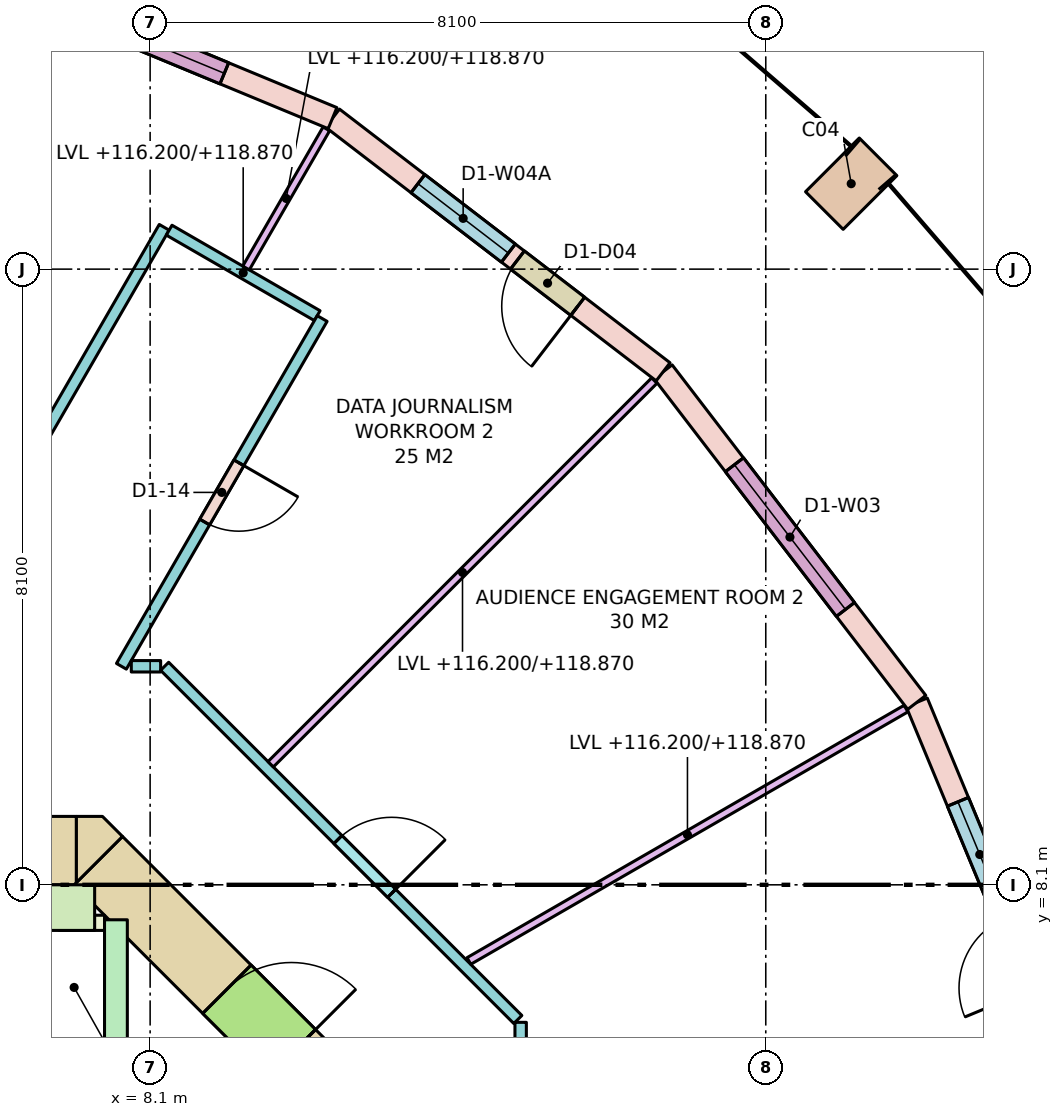
"""IFC4 building model, lengths in metres.
Left out: names, types, materials, properties, quantities, classifications, styles, units other than length and angle.
Written with IfcOpenShell. Run it as: python <this file> out.ifc"""

import sys

from ifc_helpers import new_model, si_unit, direction, frame, frame_2d, origin, origin_2d, place, context, subcontext, project, spatial, polyline, rectangle, outline, extrude, element, fill, save


model = new_model("IFC4")
c1 = context("Model", 3, precision=1e-05, world=origin(), true_north=direction((0.0, 1.0)))
c2 = subcontext(c1, "Body", "Model", "MODEL_VIEW")
j1 = project(units=[si_unit("LENGTHUNIT", "METRE"), si_unit("PLANEANGLEUNIT", "RADIAN")], contexts=[c1])
p1 = place(None, origin())
s1 = spatial("IfcSite", under=j1, at=p1, CompositionType="ELEMENT")
p2 = place(p1, origin())
s2 = spatial("IfcBuilding", under=s1, at=p2, CompositionType="ELEMENT")
p3 = place(p2, frame((0.0, 0.0, 116.2)))
s3 = spatial("IfcBuildingStorey", under=s2, at=p3, CompositionType="ELEMENT", Elevation=116.2)
p4 = place(p3, frame((17.324, 17.324, 0.0), z_axis=(0.0, 0.0, 1.0), x_axis=(-0.707106781187, 0.707106781187, 0.0)))
e1 = element("IfcColumn", 1, at=p4, inside=s3, PredefinedType="COLUMN", context=c2, shape_type="SweptSolid", body=[
    extrude(rectangle(XDim=0.7, YDim=1.0, at=origin_2d()), origin(), (0.0, 0.0, 1.0), 3.8),
])
p5 = place(p3, frame((-7.13, 8.55, -0.28), z_axis=(0.0, 0.0, 1.0), x_axis=(1.0, 0.0, 0.0)))
e2 = element("IfcWall", 2, at=p5, inside=s3, PredefinedType="SHEAR", context=c2, shape_type="SweptSolid", body=[
    extrude(rectangle(XDim=14.26, YDim=0.9, at=frame_2d((7.13, 0.0))), origin(), (0.0, 0.0, 1.0), 3.8),
])
p6 = place(p5, frame((5.48, 0.0, 0.28)))
e3 = element("IfcOpeningElement", 3, at=p6, cuts=e2, PredefinedType="OPENING", context=c2, shape_type="SweptSolid", body=[
    extrude(rectangle(XDim=0.7, YDim=2.1, at=frame_2d((0.35, 1.05))), frame((0.0, 0.46, 0.0), z_axis=(0.0, -1.0, 0.0), x_axis=(1.0, 0.0, 0.0)), (0.0, 0.0, 1.0), 0.92),
])
p7 = place(p5, frame((7.155, 0.0, 0.28)))
e4 = element("IfcOpeningElement", 4, at=p7, cuts=e2, PredefinedType="OPENING", context=c2, shape_type="SweptSolid", body=[
    extrude(rectangle(XDim=0.9, YDim=2.1, at=frame_2d((0.45, 1.05))), frame((0.0, 0.46, 0.0), z_axis=(0.0, -1.0, 0.0), x_axis=(1.0, 0.0, 0.0)), (0.0, 0.0, 1.0), 0.92),
])
p8 = place(p3, frame((7.418, 8.418, -0.28), z_axis=(0.0, 0.0, 1.0), x_axis=(0.707106781187, -0.707106781187, 0.0)))
e5 = element("IfcWall", 5, at=p8, inside=s3, PredefinedType="SHEAR", context=c2, shape_type="SweptSolid", body=[
    extrude(rectangle(XDim=4.243, YDim=0.9, at=frame_2d((2.121, 0.0))), origin(), (0.0, 0.0, 1.0), 3.8),
])
p9 = place(p8, frame((2.393, 0.0, 0.28)))
e6 = element("IfcOpeningElement", 6, at=p9, cuts=e5, PredefinedType="OPENING", context=c2, shape_type="SweptSolid", body=[
    extrude(rectangle(XDim=1.2, YDim=2.1, at=frame_2d((0.6, 1.05))), frame((0.0, 0.46, 0.0), z_axis=(0.0, -1.0, 0.0), x_axis=(1.0, 0.0, 0.0)), (0.0, 0.0, 1.0), 0.92),
])
p10 = place(p3, frame((0.0, 0.0, -0.28)))
e7 = element("IfcWall", 7, at=p10, inside=s3, PredefinedType="SHEAR", context=c2, shape_type="SweptSolid", body=[
    extrude(outline(polyline([(7.473, 9.0), (7.736, 8.736), (7.13, 8.13), (7.13, 9.0), (7.473, 9.0)])), origin(), (0.0, 0.0, 1.0), 3.8),
])
p11 = place(p3, frame((7.65, 4.5, 0.0), z_axis=(0.0, 0.0, 1.0), x_axis=(0.0, 1.0, 0.0)))
e8 = element("IfcWall", 8, at=p11, inside=s3, PredefinedType="SHEAR", context=c2, shape_type="SweptSolid", body=[
    extrude(rectangle(XDim=3.14, YDim=0.3, at=frame_2d((1.57, 0.0))), origin(), (0.0, 0.0, 1.0), 3.52),
])
p12 = place(p11, frame((0.14, 0.0, 0.0)))
e9 = element("IfcOpeningElement", 9, at=p12, cuts=e8, PredefinedType="OPENING", context=c2, shape_type="SweptSolid", body=[
    extrude(rectangle(XDim=1.32, YDim=2.1, at=frame_2d((0.66, 1.05))), frame((0.0, 0.16, 0.0), z_axis=(0.0, -1.0, 0.0), x_axis=(1.0, 0.0, 0.0)), (0.0, 0.0, 1.0), 0.32),
])
p13 = place(p3, frame((2.0, 7.8, 0.0), z_axis=(0.0, 0.0, 1.0), x_axis=(1.0, 0.0, 0.0)))
e10 = element("IfcWall", 10, at=p13, inside=s3, PredefinedType="SHEAR", context=c2, shape_type="SweptSolid", body=[
    extrude(rectangle(XDim=5.37, YDim=0.6, at=frame_2d((2.685, 0.0))), origin(), (0.0, 0.0, 1.0), 3.52),
])
p14 = place(p3, frame((6.9, 7.6, 0.0), z_axis=(0.0, 0.0, 1.0), x_axis=(1.0, 0.0, 0.0)))
e11 = element("IfcWall", 11, at=p14, inside=s3, PredefinedType="SHEAR", context=c2, shape_type="SweptSolid", body=[
    extrude(rectangle(XDim=0.6, YDim=0.2, at=frame_2d((0.3, 0.0))), origin(), (0.0, 0.0, 1.0), 3.52),
])
p15 = place(p3, frame((20.284, 5.435, 0.0), z_axis=(0.0, 0.0, 1.0), x_axis=(-0.382688740813, 0.923877333662, 0.0)))
e12 = element("IfcWall", 12, at=p15, inside=s3, PredefinedType="STANDARD", context=c2, shape_type="SweptSolid", body=[
    extrude(rectangle(XDim=5.482, YDim=0.3, at=frame_2d((2.741, 0.0))), origin(), (0.0, 0.0, 1.0), 3.52),
])
p16 = place(p15, frame((1.416, 0.0, 0.0)))
e13 = element("IfcOpeningElement", 13, at=p16, cuts=e12, PredefinedType="OPENING", context=c2, shape_type="SweptSolid", body=[
    extrude(rectangle(XDim=1.0, YDim=2.4, at=frame_2d((0.5, 1.2))), frame((0.0, 0.16, 0.0), z_axis=(0.0, -1.0, 0.0), x_axis=(1.0, 0.0, 0.0)), (0.0, 0.0, 1.0), 0.32),
])
p17 = place(p15, frame((2.566, 0.0, 0.8)))
e14 = element("IfcOpeningElement", 14, at=p17, cuts=e12, PredefinedType="OPENING", context=c2, shape_type="SweptSolid", body=[
    extrude(rectangle(XDim=1.5, YDim=2.5, at=frame_2d((0.75, 1.25))), frame((0.0, 0.16, 0.0), z_axis=(0.0, -1.0, 0.0), x_axis=(1.0, 0.0, 0.0)), (0.0, 0.0, 1.0), 0.32),
])
p18 = place(p3, frame((18.187, 10.5, 0.0), z_axis=(0.0, 0.0, 1.0), x_axis=(-0.608784891166, 0.793335336593, 0.0)))
e15 = element("IfcWall", 15, at=p18, inside=s3, PredefinedType="STANDARD", context=c2, shape_type="SweptSolid", body=[
    extrude(rectangle(XDim=5.482, YDim=0.3, at=frame_2d((2.741, 0.0))), origin(), (0.0, 0.0, 1.0), 3.52),
])
p19 = place(p18, frame((1.541, 0.0, 0.8)))
e16 = element("IfcOpeningElement", 16, at=p19, cuts=e15, PredefinedType="OPENING", context=c2, shape_type="SweptSolid", body=[
    extrude(rectangle(XDim=2.4, YDim=2.5, at=frame_2d((1.2, 1.25))), frame((0.0, 0.16, 0.0), z_axis=(0.0, -1.0, 0.0), x_axis=(1.0, 0.0, 0.0)), (0.0, 0.0, 1.0), 0.32),
])
p20 = place(p3, frame((14.849, 14.849, 0.0), z_axis=(0.0, 0.0, 1.0), x_axis=(-0.793335336593, 0.608784891166, 0.0)))
e17 = element("IfcWall", 17, at=p20, inside=s3, PredefinedType="STANDARD", context=c2, shape_type="SweptSolid", body=[
    extrude(rectangle(XDim=5.482, YDim=0.3, at=frame_2d((2.741, 0.0))), origin(), (0.0, 0.0, 1.0), 3.52),
])
p21 = place(p20, frame((1.416, 0.0, 0.0)))
e18 = element("IfcOpeningElement", 18, at=p21, cuts=e17, PredefinedType="OPENING", context=c2, shape_type="SweptSolid", body=[
    extrude(rectangle(XDim=1.0, YDim=2.4, at=frame_2d((0.5, 1.2))), frame((0.0, 0.16, 0.0), z_axis=(0.0, -1.0, 0.0), x_axis=(1.0, 0.0, 0.0)), (0.0, 0.0, 1.0), 0.32),
])
p22 = place(p20, frame((2.566, 0.0, 0.8)))
e19 = element("IfcOpeningElement", 19, at=p22, cuts=e17, PredefinedType="OPENING", context=c2, shape_type="SweptSolid", body=[
    extrude(rectangle(XDim=1.5, YDim=2.5, at=frame_2d((0.75, 1.25))), frame((0.0, 0.16, 0.0), z_axis=(0.0, -1.0, 0.0), x_axis=(1.0, 0.0, 0.0)), (0.0, 0.0, 1.0), 0.32),
])
p23 = place(p3, frame((10.5, 18.187, 0.0), z_axis=(0.0, 0.0, 1.0), x_axis=(-0.923877333662, 0.382688740813, 0.0)))
e20 = element("IfcWall", 20, at=p23, inside=s3, PredefinedType="STANDARD", context=c2, shape_type="SweptSolid", body=[
    extrude(rectangle(XDim=5.482, YDim=0.3, at=frame_2d((2.741, 0.0))), origin(), (0.0, 0.0, 1.0), 3.52),
])
p24 = place(p23, frame((1.541, 0.0, 0.8)))
e21 = element("IfcOpeningElement", 21, at=p24, cuts=e20, PredefinedType="OPENING", context=c2, shape_type="SweptSolid", body=[
    extrude(rectangle(XDim=2.4, YDim=2.5, at=frame_2d((1.2, 1.25))), frame((0.0, 0.16, 0.0), z_axis=(0.0, -1.0, 0.0), x_axis=(1.0, 0.0, 0.0)), (0.0, 0.0, 1.0), 0.32),
])
p25 = place(p3, frame((4.983, 11.031, 0.0), z_axis=(0.0, 0.0, 1.0), x_axis=(0.499988075443, 0.866032288321, 0.0)))
e22 = element("IfcWall", 22, at=p25, inside=s3, PredefinedType="PARTITIONING", context=c2, shape_type="SweptSolid", body=[
    extrude(rectangle(XDim=6.604, YDim=0.15, at=frame_2d((3.302, 0.0))), origin(), (0.0, 0.0, 1.0), 3.52),
])
p26 = place(p3, frame((8.35, 16.713, 0.0), z_axis=(0.0, 0.0, 1.0), x_axis=(0.866017533419, -0.500013631625, 0.0)))
e23 = element("IfcWall", 23, at=p26, inside=s3, PredefinedType="PARTITIONING", context=c2, shape_type="SweptSolid", body=[
    extrude(rectangle(XDim=2.25, YDim=0.15, at=frame_2d((1.125, 0.0))), origin(), (0.0, 0.0, 1.0), 2.67),
])
p27 = place(p3, frame((10.364, 15.55, 0.0), z_axis=(0.0, 0.0, 1.0), x_axis=(-0.499981143329, -0.866036290415, 0.0)))
e24 = element("IfcWall", 24, at=p27, inside=s3, PredefinedType="PARTITIONING", context=c2, shape_type="SweptSolid", body=[
    extrude(rectangle(XDim=5.283, YDim=0.15, at=frame_2d((2.642, 0.0))), origin(), (0.0, 0.0, 1.0), 3.52),
])
p28 = place(p27, frame((2.191, 0.0, 0.0)))
e25 = element("IfcOpeningElement", 25, at=p28, cuts=e24, PredefinedType="OPENING", context=c2, shape_type="SweptSolid", body=[
    extrude(rectangle(XDim=0.9, YDim=2.1, at=frame_2d((0.45, 1.05))), frame((0.0, 0.085, 0.0), z_axis=(0.0, -1.0, 0.0), x_axis=(1.0, 0.0, 0.0)), (0.0, 0.0, 1.0), 0.17),
])
p29 = place(p3, frame((7.852, 10.975, 0.0), z_axis=(0.0, 0.0, 1.0), x_axis=(1.0, 0.0, 0.0)))
e26 = element("IfcWall", 26, at=p29, inside=s3, PredefinedType="PARTITIONING", context=c2, shape_type="SweptSolid", body=[
    extrude(rectangle(XDim=0.386, YDim=0.15, at=frame_2d((0.193, 0.0))), origin(), (0.0, 0.0, 1.0), 3.52),
])
p30 = place(p3, frame((8.291, 10.975, 0.0), z_axis=(0.0, 0.0, 1.0), x_axis=(0.707088206597, -0.707125355289, 0.0)))
e27 = element("IfcWall", 27, at=p30, inside=s3, PredefinedType="PARTITIONING", context=c2, shape_type="SweptSolid", body=[
    extrude(rectangle(XDim=6.572, YDim=0.15, at=frame_2d((3.286, 0.0))), origin(), (0.0, 0.0, 1.0), 2.67),
])
p31 = place(p30, frame((3.224, 0.0, 0.0)))
e28 = element("IfcOpeningElement", 28, at=p31, cuts=e27, PredefinedType="OPENING", context=c2, shape_type="SweptSolid", body=[
    extrude(rectangle(XDim=1.0, YDim=2.1, at=frame_2d((0.5, 1.05))), frame((0.0, 0.085, 0.0), z_axis=(0.0, -1.0, 0.0), x_axis=(1.0, 0.0, 0.0)), (0.0, 0.0, 1.0), 0.17),
])
p32 = place(p3, frame((12.975, 6.291, 0.0), z_axis=(0.0, 0.0, 1.0), x_axis=(0.0, -1.0, 0.0)))
e29 = element("IfcWall", 29, at=p32, inside=s3, PredefinedType="PARTITIONING", context=c2, shape_type="SweptSolid", body=[
    extrude(rectangle(XDim=12.582, YDim=0.15, at=frame_2d((6.291, 0.0))), origin(), (0.0, 0.0, 1.0), 2.67),
])
p33 = place(p32, frame((5.391, 0.0, 0.0)))
e30 = element("IfcOpeningElement", 30, at=p33, cuts=e29, PredefinedType="OPENING", context=c2, shape_type="SweptSolid", body=[
    extrude(rectangle(XDim=1.8, YDim=2.1, at=frame_2d((0.9, 1.05))), frame((0.0, 0.085, 0.0), z_axis=(0.0, -1.0, 0.0), x_axis=(1.0, 0.0, 0.0)), (0.0, 0.0, 1.0), 0.17),
])
p34 = place(p3, frame((12.294, 7.098, 0.0), z_axis=(0.0, 0.0, 1.0), x_axis=(0.866010486135, 0.500025837236, 0.0)))
e31 = element("IfcWall", 31, at=p34, inside=s3, PredefinedType="PARTITIONING", context=c2, shape_type="SweptSolid", body=[
    extrude(rectangle(XDim=6.641, YDim=0.1, at=frame_2d((3.32, 0.0))), origin(), (0.0, 0.0, 1.0), 2.67),
])
p35 = place(p3, frame((9.686, 9.686, 0.0), z_axis=(0.0, 0.0, 1.0), x_axis=(0.707106781187, 0.707106781187, 0.0)))
e32 = element("IfcWall", 32, at=p35, inside=s3, PredefinedType="PARTITIONING", context=c2, shape_type="SweptSolid", body=[
    extrude(rectangle(XDim=7.139, YDim=0.1, at=frame_2d((3.569, 0.0))), origin(), (0.0, 0.0, 1.0), 2.67),
])
p36 = place(p3, frame((9.362, 16.215, 0.0), z_axis=(0.0, 0.0, 1.0), x_axis=(0.500015802937, 0.866016279763, 0.0)))
e33 = element("IfcWall", 33, at=p36, inside=s3, PredefinedType="PARTITIONING", context=c2, shape_type="SweptSolid", body=[
    extrude(rectangle(XDim=2.113, YDim=0.1, at=frame_2d((1.057, 0.0))), origin(), (0.0, 0.0, 1.0), 2.67),
])
p37 = place(p17, origin())
e34 = element("IfcWindow", 34, at=p37, inside=s3, PartitioningType="SINGLE_PANEL", PredefinedType="WINDOW", context=c2, shape_type="SweptSolid", body=[
    extrude(rectangle(XDim=1.5, YDim=2.5, at=frame_2d((0.75, 1.25))), frame((0.0, 0.03, 0.0), z_axis=(0.0, -1.0, 0.0), x_axis=(1.0, 0.0, 0.0)), (0.0, 0.0, 1.0), 0.06),
])
fill(e14, e34)
p38 = place(p19, origin())
e35 = element("IfcWindow", 35, at=p38, inside=s3, PartitioningType="SINGLE_PANEL", PredefinedType="WINDOW", context=c2, shape_type="SweptSolid", body=[
    extrude(rectangle(XDim=2.4, YDim=2.5, at=frame_2d((1.2, 1.25))), frame((0.0, 0.03, 0.0), z_axis=(0.0, -1.0, 0.0), x_axis=(1.0, 0.0, 0.0)), (0.0, 0.0, 1.0), 0.06),
])
fill(e16, e35)
p39 = place(p21, origin())
e36 = element("IfcDoor", 36, at=p39, inside=s3, OperationType="SINGLE_SWING_LEFT", PredefinedType="DOOR", context=c2, shape_type="SweptSolid", body=[
    extrude(rectangle(XDim=1.0, YDim=2.4, at=frame_2d((0.5, 1.2))), frame((0.0, 0.025, 0.0), z_axis=(0.0, -1.0, 0.0), x_axis=(1.0, 0.0, 0.0)), (0.0, 0.0, 1.0), 0.05),
])
fill(e18, e36)
p40 = place(p22, origin())
e37 = element("IfcWindow", 37, at=p40, inside=s3, PartitioningType="SINGLE_PANEL", PredefinedType="WINDOW", context=c2, shape_type="SweptSolid", body=[
    extrude(rectangle(XDim=1.5, YDim=2.5, at=frame_2d((0.75, 1.25))), frame((0.0, 0.03, 0.0), z_axis=(0.0, -1.0, 0.0), x_axis=(1.0, 0.0, 0.0)), (0.0, 0.0, 1.0), 0.06),
])
fill(e19, e37)
p41 = place(p24, origin())
e38 = element("IfcWindow", 38, at=p41, inside=s3, PartitioningType="SINGLE_PANEL", PredefinedType="WINDOW", context=c2, shape_type="SweptSolid", body=[
    extrude(rectangle(XDim=2.4, YDim=2.5, at=frame_2d((1.2, 1.25))), frame((0.0, 0.03, 0.0), z_axis=(0.0, -1.0, 0.0), x_axis=(1.0, 0.0, 0.0)), (0.0, 0.0, 1.0), 0.06),
])
fill(e21, e38)
p42 = place(p9, origin())
e39 = element("IfcDoor", 39, at=p42, inside=s3, OperationType="SINGLE_SWING_RIGHT", PredefinedType="DOOR", context=c2, shape_type="SweptSolid", body=[
    extrude(rectangle(XDim=1.2, YDim=2.1, at=frame_2d((0.6, 1.05))), frame((0.0, 0.025, 0.0), z_axis=(0.0, -1.0, 0.0), x_axis=(1.0, 0.0, 0.0)), (0.0, 0.0, 1.0), 0.05),
])
fill(e6, e39)
p43 = place(p31, origin())
e40 = element("IfcDoor", 40, at=p43, inside=s3, OperationType="SINGLE_SWING_RIGHT", PredefinedType="DOOR", context=c2, shape_type="SweptSolid", body=[
    extrude(rectangle(XDim=1.0, YDim=2.1, at=frame_2d((0.5, 1.05))), frame((0.0, 0.025, 0.0), z_axis=(0.0, -1.0, 0.0), x_axis=(1.0, 0.0, 0.0)), (0.0, 0.0, 1.0), 0.05),
])
fill(e28, e40)
p44 = place(p28, origin())
e41 = element("IfcDoor", 41, at=p44, inside=s3, OperationType="SINGLE_SWING_LEFT", PredefinedType="DOOR", context=c2, shape_type="SweptSolid", body=[
    extrude(rectangle(XDim=0.9, YDim=2.1, at=frame_2d((0.45, 1.05))), frame((0.0, 0.025, 0.0), z_axis=(0.0, -1.0, 0.0), x_axis=(1.0, 0.0, 0.0)), (0.0, 0.0, 1.0), 0.05),
])
fill(e25, e41)
save(model, sys.argv[1])
